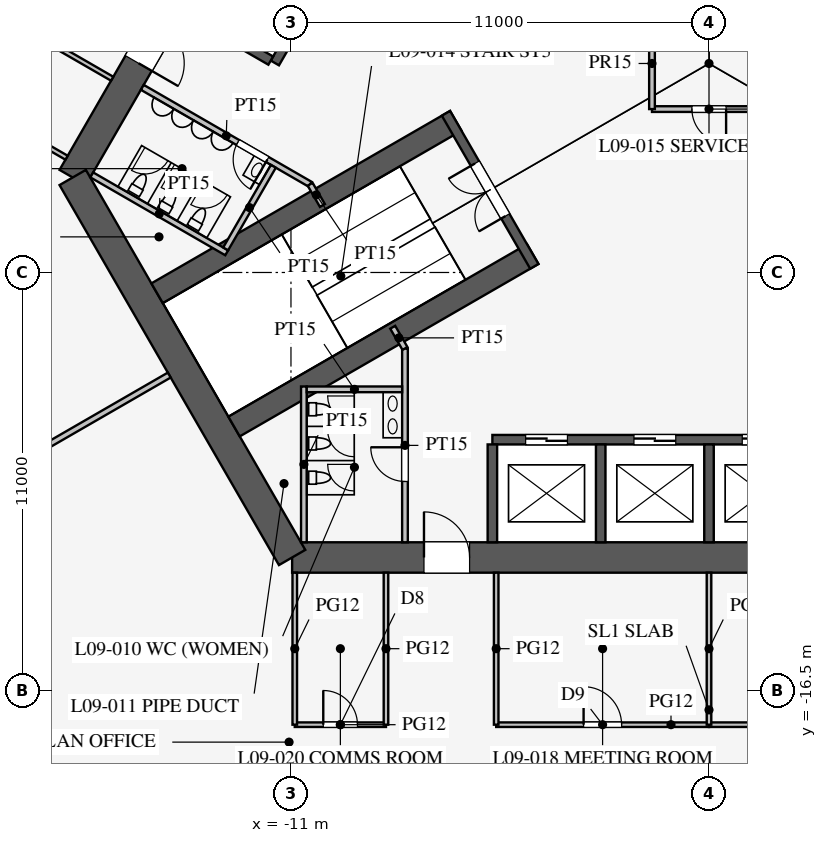
"""IFC4 building model, lengths in metres.
Left out: names, types, materials, properties, quantities, classifications, styles, units other than length and angle.
Written with IfcOpenShell. Run it as: python <this file> out.ifc"""

import sys

from ifc_helpers import new_model, si_unit, direction, frame, frame_2d, origin, place, context, subcontext, project, spatial, rectangle, extrude, element, fill, save


model = new_model("IFC4")
c1 = context("Model", 3, precision=1e-05, world=origin(), true_north=direction((0.0, 1.0)))
c2 = subcontext(c1, "Body", "Model", "MODEL_VIEW")
j1 = project(units=[si_unit("LENGTHUNIT", "METRE"), si_unit("PLANEANGLEUNIT", "RADIAN")], contexts=[c1])
p1 = place(None, origin())
s1 = spatial("IfcSite", under=j1, at=p1, CompositionType="ELEMENT")
p2 = place(p1, origin())
s2 = spatial("IfcBuilding", under=s1, at=p2, CompositionType="ELEMENT")
p3 = place(p2, frame((0.0, 0.0, 41.7)))
s3 = spatial("IfcBuildingStorey", under=s2, at=p3, CompositionType="ELEMENT", Elevation=41.7)
p4 = place(p3, frame((-10.97, -13.0, 0.0), z_axis=(0.0, 0.0, 1.0), x_axis=(1.0, 0.0, 0.0)))
e1 = element("IfcWall", 1, at=p4, inside=s3, PredefinedType="SHEAR", context=c2, shape_type="SweptSolid", body=[
    extrude(rectangle(XDim=21.939, YDim=0.8, at=frame_2d((10.97, 0.0))), origin(), (0.0, 0.0, 1.0), 4.2),
])
p5 = place(p4, frame((17.27, 0.0, 0.0)))
e2 = element("IfcOpeningElement", 2, at=p5, cuts=e1, PredefinedType="OPENING", context=c2, shape_type="SweptSolid", body=[
    extrude(rectangle(XDim=1.2, YDim=2.1, at=frame_2d((0.6, 1.05))), frame((0.0, 0.41, 0.0), z_axis=(0.0, -1.0, 0.0), x_axis=(1.0, 0.0, 0.0)), (0.0, 0.0, 1.0), 0.82),
])
p6 = place(p4, frame((3.47, 0.0, 0.0)))
e3 = element("IfcOpeningElement", 3, at=p6, cuts=e1, PredefinedType="OPENING", context=c2, shape_type="SweptSolid", body=[
    extrude(rectangle(XDim=1.2, YDim=2.1, at=frame_2d((0.6, 1.05))), frame((0.0, 0.41, 0.0), z_axis=(0.0, -1.0, 0.0), x_axis=(1.0, 0.0, 0.0)), (0.0, 0.0, 1.0), 0.82),
])
p7 = place(p3, frame((-5.773, 16.0, 0.0), z_axis=(0.0, 0.0, 1.0), x_axis=(-0.500002442456, -0.866023993627, 0.0)))
e4 = element("IfcWall", 4, at=p7, inside=s3, PredefinedType="SHEAR", context=c2, shape_type="SweptSolid", body=[
    extrude(rectangle(XDim=21.939, YDim=0.8, at=frame_2d((10.97, 0.0))), origin(), (0.0, 0.0, 1.0), 4.2),
])
p8 = place(p7, frame((17.27, 0.0, 0.0)))
e5 = element("IfcOpeningElement", 5, at=p8, cuts=e4, PredefinedType="OPENING", context=c2, shape_type="SweptSolid", body=[
    extrude(rectangle(XDim=1.2, YDim=2.1, at=frame_2d((0.6, 1.05))), frame((0.0, 0.41, 0.0), z_axis=(0.0, -1.0, 0.0), x_axis=(1.0, 0.0, 0.0)), (0.0, 0.0, 1.0), 0.82),
])
p9 = place(p7, frame((3.47, 0.0, 0.0)))
e6 = element("IfcOpeningElement", 6, at=p9, cuts=e4, PredefinedType="OPENING", context=c2, shape_type="SweptSolid", body=[
    extrude(rectangle(XDim=1.2, YDim=2.1, at=frame_2d((0.6, 1.05))), frame((0.0, 0.41, 0.0), z_axis=(0.0, -1.0, 0.0), x_axis=(1.0, 0.0, 0.0)), (0.0, 0.0, 1.0), 0.82),
])
p10 = place(p3, frame((-16.743, -3.0, 0.0), z_axis=(0.0, 0.0, 1.0), x_axis=(0.499995765644, -0.866027848477, 0.0)))
e7 = element("IfcWall", 7, at=p10, inside=s3, PredefinedType="SHEAR", context=c2, shape_type="SweptSolid", body=[
    extrude(rectangle(XDim=11.547, YDim=0.8, at=frame_2d((5.773, 0.0))), origin(), (0.0, 0.0, 1.0), 4.2),
])
p11 = place(p3, frame((-5.7, -9.9, 0.0), z_axis=(0.0, 0.0, 1.0), x_axis=(1.0, 0.0, 0.0)))
e8 = element("IfcWall", 8, at=p11, inside=s3, PredefinedType="SHEAR", context=c2, shape_type="SweptSolid", body=[
    extrude(rectangle(XDim=11.4, YDim=0.25, at=frame_2d((5.7, 0.0))), origin(), (0.0, 0.0, 1.0), 4.2),
])
p12 = place(p11, frame((0.875, 0.0, 0.0)))
e9 = element("IfcOpeningElement", 9, at=p12, cuts=e8, PredefinedType="OPENING", context=c2, shape_type="SweptSolid", body=[
    extrude(rectangle(XDim=1.1, YDim=2.2, at=frame_2d((0.55, 1.1))), frame((0.0, 0.135, 0.0), z_axis=(0.0, -1.0, 0.0), x_axis=(1.0, 0.0, 0.0)), (0.0, 0.0, 1.0), 0.27),
])
p13 = place(p11, frame((3.725, 0.0, 0.0)))
e10 = element("IfcOpeningElement", 10, at=p13, cuts=e8, PredefinedType="OPENING", context=c2, shape_type="SweptSolid", body=[
    extrude(rectangle(XDim=1.1, YDim=2.2, at=frame_2d((0.55, 1.1))), frame((0.0, 0.135, 0.0), z_axis=(0.0, -1.0, 0.0), x_axis=(1.0, 0.0, 0.0)), (0.0, 0.0, 1.0), 0.27),
])
p14 = place(p11, frame((6.575, 0.0, 0.0)))
e11 = element("IfcOpeningElement", 11, at=p14, cuts=e8, PredefinedType="OPENING", context=c2, shape_type="SweptSolid", body=[
    extrude(rectangle(XDim=1.1, YDim=2.2, at=frame_2d((0.55, 1.1))), frame((0.0, 0.135, 0.0), z_axis=(0.0, -1.0, 0.0), x_axis=(1.0, 0.0, 0.0)), (0.0, 0.0, 1.0), 0.27),
])
p15 = place(p11, frame((9.425, 0.0, 0.0)))
e12 = element("IfcOpeningElement", 12, at=p15, cuts=e8, PredefinedType="OPENING", context=c2, shape_type="SweptSolid", body=[
    extrude(rectangle(XDim=1.1, YDim=2.2, at=frame_2d((0.55, 1.1))), frame((0.0, 0.135, 0.0), z_axis=(0.0, -1.0, 0.0), x_axis=(1.0, 0.0, 0.0)), (0.0, 0.0, 1.0), 0.27),
])
for number, where, z_axis, x_axis in (
    (13, (-5.7, -10.025, 0.0), (0.0, 0.0, 1.0), (0.0, -1.0, 0.0)),
    (14, (-2.85, -10.025, 0.0), (0.0, 0.0, 1.0), (0.0, -1.0, 0.0)),
    (15, (0.0, -10.025, 0.0), (0.0, 0.0, 1.0), (0.0, -1.0, 0.0)),
):
    element("IfcWall", number, at=place(p3, frame(where, z_axis=z_axis, x_axis=x_axis)), inside=s3, PredefinedType="SHEAR", context=c2, shape_type="SweptSolid", body=[
        extrude(rectangle(XDim=2.575, YDim=0.25, at=frame_2d((1.288, 0.0))), origin(), (0.0, 0.0, 1.0), 4.2),
    ])
p16 = place(p3, frame((-5.724, 9.886, 0.0), z_axis=(0.0, 0.0, 1.0), x_axis=(-0.500001763848, -0.866024385424, 0.0)))
e16 = element("IfcWall", 16, at=p16, inside=s3, PredefinedType="SHEAR", context=c2, shape_type="SweptSolid", body=[
    extrude(rectangle(XDim=11.4, YDim=0.25, at=frame_2d((5.7, 0.0))), origin(), (0.0, 0.0, 1.0), 4.2),
])
p17 = place(p16, frame((6.525, 0.0, 0.0)))
e17 = element("IfcOpeningElement", 17, at=p17, cuts=e16, PredefinedType="OPENING", context=c2, shape_type="SweptSolid", body=[
    extrude(rectangle(XDim=1.2, YDim=2.2, at=frame_2d((0.6, 1.1))), frame((0.0, 0.135, 0.0), z_axis=(0.0, -1.0, 0.0), x_axis=(1.0, 0.0, 0.0)), (0.0, 0.0, 1.0), 0.27),
])
p18 = place(p16, frame((9.375, 0.0, 0.0)))
e18 = element("IfcOpeningElement", 18, at=p18, cuts=e16, PredefinedType="OPENING", context=c2, shape_type="SweptSolid", body=[
    extrude(rectangle(XDim=1.2, YDim=2.2, at=frame_2d((0.6, 1.1))), frame((0.0, 0.135, 0.0), z_axis=(0.0, -1.0, 0.0), x_axis=(1.0, 0.0, 0.0)), (0.0, 0.0, 1.0), 0.27),
])
p19 = place(p3, frame((-11.532, 0.076, 0.0), z_axis=(0.0, 0.0, 1.0), x_axis=(-0.866005588531, 0.500034319456, 0.0)))
e19 = element("IfcWall", 19, at=p19, inside=s3, PredefinedType="SHEAR", context=c2, shape_type="SweptSolid", body=[
    extrude(rectangle(XDim=2.575, YDim=0.25, at=frame_2d((1.288, 0.0))), origin(), (0.0, 0.0, 1.0), 4.2),
])
for number, where, z_axis, x_axis in (
    (20, (-6.663, -1.509, 0.0), (0.0, 0.0, 1.0), (-0.866, -0.5, 0.0)),
    (21, (-4.638, -5.016, 0.0), (0.0, 0.0, 1.0), (-0.866, -0.5, 0.0)),
):
    element("IfcWall", number, at=place(p3, frame(where, z_axis=z_axis, x_axis=x_axis)), inside=s3, PredefinedType="SHEAR", context=c2, shape_type="SweptSolid", body=[
        extrude(rectangle(XDim=9.075, YDim=0.6, at=frame_2d((4.538, 0.0))), origin(), (0.0, 0.0, 1.0), 4.2),
    ])
p20 = place(p3, frame((-6.922, -1.312, 0.0), z_axis=(0.0, 0.0, 1.0), x_axis=(0.499984536904, -0.866034331223, 0.0)))
e22 = element("IfcWall", 22, at=p20, inside=s3, PredefinedType="SHEAR", context=c2, shape_type="SweptSolid", body=[
    extrude(rectangle(XDim=4.65, YDim=0.25, at=frame_2d((2.325, 0.0))), origin(), (0.0, 0.0, 1.0), 4.2),
])
p21 = place(p20, frame((1.525, 0.0, 0.0)))
e23 = element("IfcOpeningElement", 23, at=p21, cuts=e22, PredefinedType="OPENING", context=c2, shape_type="SweptSolid", body=[
    extrude(rectangle(XDim=1.6, YDim=2.1, at=frame_2d((0.8, 1.05))), frame((0.0, 0.135, 0.0), z_axis=(0.0, -1.0, 0.0), x_axis=(1.0, 0.0, 0.0)), (0.0, 0.0, 1.0), 0.27),
])
p22 = place(p3, frame((-8.0, -7.5, 0.0), z_axis=(0.0, 0.0, 1.0), x_axis=(0.0, -1.0, 0.0)))
e24 = element("IfcWall", 24, at=p22, inside=s3, PredefinedType="PARTITIONING", context=c2, shape_type="SweptSolid", body=[
    extrude(rectangle(XDim=5.1, YDim=0.15, at=frame_2d((2.55, 0.0))), origin(), (0.0, 0.0, 1.0), 4.0),
])
p23 = place(p22, frame((2.6, 0.0, 0.0)))
e25 = element("IfcOpeningElement", 25, at=p23, cuts=e24, PredefinedType="OPENING", context=c2, shape_type="SweptSolid", body=[
    extrude(rectangle(XDim=0.9, YDim=2.1, at=frame_2d((0.45, 1.05))), frame((0.0, 0.085, 0.0), z_axis=(0.0, -1.0, 0.0), x_axis=(1.0, 0.0, 0.0)), (0.0, 0.0, 1.0), 0.17),
])
p24 = place(p3, frame((-10.495, -3.178, 0.0), z_axis=(0.0, 0.0, 1.0), x_axis=(-0.86602216432, 0.500005610874, 0.0)))
e26 = element("IfcWall", 26, at=p24, inside=s3, PredefinedType="PARTITIONING", context=c2, shape_type="SweptSolid", body=[
    extrude(rectangle(XDim=5.1, YDim=0.15, at=frame_2d((2.55, 0.0))), origin(), (0.0, 0.0, 1.0), 4.0),
])
p25 = place(p24, frame((1.3, 0.0, 0.0)))
e27 = element("IfcOpeningElement", 27, at=p25, cuts=e26, PredefinedType="OPENING", context=c2, shape_type="SweptSolid", body=[
    extrude(rectangle(XDim=0.9, YDim=2.1, at=frame_2d((0.45, 1.05))), frame((0.0, 0.085, 0.0), z_axis=(0.0, -1.0, 0.0), x_axis=(1.0, 0.0, 0.0)), (0.0, 0.0, 1.0), 0.17),
])
for number, where, z_axis, x_axis in (
    (28, (-10.495, -3.178, 0.0), (0.0, 0.0, 1.0), (0.5, -0.866, 0.0)),
    (29, (-8.0, -7.5, 0.0), (0.0, 0.0, 1.0), (-0.5, 0.866, 0.0)),
):
    element("IfcWall", number, at=place(p3, frame(where, z_axis=z_axis, x_axis=x_axis)), inside=s3, PredefinedType="PARTITIONING", context=c2, shape_type="SweptSolid", body=[
        extrude(rectangle(XDim=0.645, YDim=0.15, at=frame_2d((0.323, 0.0))), origin(), (0.0, 0.0, 1.0), 4.0),
    ])
p26 = place(p3, frame((-12.691, -4.982, 0.0), z_axis=(0.0, 0.0, 1.0), x_axis=(-0.8660249478, 0.500000789788, 0.0)))
e30 = element("IfcWall", 30, at=p26, inside=s3, PredefinedType="PARTITIONING", context=c2, shape_type="SweptSolid", body=[
    extrude(rectangle(XDim=4.1, YDim=0.15, at=frame_2d((2.05, 0.0))), origin(), (0.0, 0.0, 1.0), 4.0),
])
p27 = place(p3, frame((-11.464, -2.706, 0.0), z_axis=(0.0, 0.0, 1.0), x_axis=(-0.50001992892, -0.866013897511, 0.0)))
e31 = element("IfcWall", 31, at=p27, inside=s3, PredefinedType="PARTITIONING", context=c2, shape_type="SweptSolid", body=[
    extrude(rectangle(XDim=2.51, YDim=0.15, at=frame_2d((1.255, 0.0))), origin(), (0.0, 0.0, 1.0), 4.0),
])
p28 = place(p3, frame((-10.66, -8.5, 0.0), z_axis=(0.0, 0.0, 1.0), x_axis=(0.0, -1.0, 0.0)))
e32 = element("IfcWall", 32, at=p28, inside=s3, PredefinedType="PARTITIONING", context=c2, shape_type="SweptSolid", body=[
    extrude(rectangle(XDim=4.1, YDim=0.15, at=frame_2d((2.05, 0.0))), origin(), (0.0, 0.0, 1.0), 4.0),
])
p29 = place(p3, frame((-8.075, -8.575, 0.0), z_axis=(0.0, 0.0, 1.0), x_axis=(-1.0, 0.0, 0.0)))
e33 = element("IfcWall", 33, at=p29, inside=s3, PredefinedType="PARTITIONING", context=c2, shape_type="SweptSolid", body=[
    extrude(rectangle(XDim=2.51, YDim=0.15, at=frame_2d((1.255, 0.0))), origin(), (0.0, 0.0, 1.0), 4.0),
])
p30 = place(p3, frame((-1.5, -1.2, 0.0), z_axis=(0.0, 0.0, 1.0), x_axis=(1.0, 0.0, 0.0)))
e34 = element("IfcWall", 34, at=p30, inside=s3, PredefinedType="PARTITIONING", context=c2, shape_type="SweptSolid", body=[
    extrude(rectangle(XDim=3.0, YDim=0.15, at=frame_2d((1.5, 0.0))), origin(), (0.0, 0.0, 1.0), 4.0),
])
p31 = place(p30, frame((1.05, 0.0, 0.0)))
e35 = element("IfcOpeningElement", 35, at=p31, cuts=e34, PredefinedType="OPENING", context=c2, shape_type="SweptSolid", body=[
    extrude(rectangle(XDim=0.9, YDim=2.1, at=frame_2d((0.45, 1.05))), frame((0.0, 0.085, 0.0), z_axis=(0.0, -1.0, 0.0), x_axis=(1.0, 0.0, 0.0)), (0.0, 0.0, 1.0), 0.17),
])
p32 = place(p3, frame((-1.5, 1.2, 0.0), z_axis=(0.0, 0.0, 1.0), x_axis=(0.0, -1.0, 0.0)))
e36 = element("IfcWall", 36, at=p32, inside=s3, PredefinedType="PARTITIONING", context=c2, shape_type="SweptSolid", body=[
    extrude(rectangle(XDim=2.4, YDim=0.15, at=frame_2d((1.2, 0.0))), origin(), (0.0, 0.0, 1.0), 4.0),
])
p33 = place(p3, frame((-14.203, -8.2, 0.0), z_axis=(0.0, 0.0, 1.0), x_axis=(-0.866024965723, -0.500000758745, 0.0)))
e37 = element("IfcWall", 37, at=p33, inside=s3, PredefinedType="PARTITIONING", context=c2, shape_type="SweptSolid", body=[
    extrude(rectangle(XDim=18.25, YDim=0.15, at=frame_2d((9.125, 0.0))), origin(), (0.0, 0.0, 1.0), 2.3),
])
p34 = place(p3, frame((0.0, -17.4, 0.0), z_axis=(0.0, 0.0, 1.0), x_axis=(1.0, 0.0, 0.0)))
e38 = element("IfcWall", 38, at=p34, inside=s3, PredefinedType="PARTITIONING", context=c2, shape_type="SweptSolid", body=[
    extrude(rectangle(XDim=3.6, YDim=0.12, at=frame_2d((1.8, 0.0))), origin(), (0.0, 0.0, 1.0), 2.9),
])
p35 = place(p34, frame((1.3, 0.0, 0.15)))
e39 = element("IfcOpeningElement", 39, at=p35, cuts=e38, PredefinedType="OPENING", context=c2, shape_type="SweptSolid", body=[
    extrude(rectangle(XDim=1.0, YDim=2.1, at=frame_2d((0.5, 1.05))), frame((0.0, 0.07, 0.0), z_axis=(0.0, -1.0, 0.0), x_axis=(1.0, 0.0, 0.0)), (0.0, 0.0, 1.0), 0.14),
])
p36 = place(p3, frame((-10.9, -17.4, 0.0), z_axis=(0.0, 0.0, 1.0), x_axis=(1.0, 0.0, 0.0)))
e40 = element("IfcWall", 40, at=p36, inside=s3, PredefinedType="PARTITIONING", context=c2, shape_type="SweptSolid", body=[
    extrude(rectangle(XDim=2.4, YDim=0.12, at=frame_2d((1.2, 0.0))), origin(), (0.0, 0.0, 1.0), 2.9),
])
p37 = place(p36, frame((0.75, 0.0, 0.15)))
e41 = element("IfcOpeningElement", 41, at=p37, cuts=e40, PredefinedType="OPENING", context=c2, shape_type="SweptSolid", body=[
    extrude(rectangle(XDim=0.9, YDim=2.1, at=frame_2d((0.45, 1.05))), frame((0.0, 0.07, 0.0), z_axis=(0.0, -1.0, 0.0), x_axis=(1.0, 0.0, 0.0)), (0.0, 0.0, 1.0), 0.14),
])
p38 = place(p3, frame((-5.6, -17.4, 0.0), z_axis=(0.0, 0.0, 1.0), x_axis=(1.0, 0.0, 0.0)))
e42 = element("IfcWall", 42, at=p38, inside=s3, PredefinedType="PARTITIONING", context=c2, shape_type="SweptSolid", body=[
    extrude(rectangle(XDim=5.6, YDim=0.12, at=frame_2d((2.8, 0.0))), origin(), (0.0, 0.0, 1.0), 2.9),
])
p39 = place(p38, frame((2.3, 0.0, 0.15)))
e43 = element("IfcOpeningElement", 43, at=p39, cuts=e42, PredefinedType="OPENING", context=c2, shape_type="SweptSolid", body=[
    extrude(rectangle(XDim=1.0, YDim=2.1, at=frame_2d((0.5, 1.05))), frame((0.0, 0.07, 0.0), z_axis=(0.0, -1.0, 0.0), x_axis=(1.0, 0.0, 0.0)), (0.0, 0.0, 1.0), 0.14),
])
for number, where, z_axis, x_axis in (
    (44, (0.0, -13.4, 0.0), (0.0, 0.0, 1.0), (0.0, -1.0, 0.0)),
    (45, (-10.9, -13.4, 0.0), (0.0, 0.0, 1.0), (0.0, -1.0, 0.0)),
    (46, (-5.6, -13.4, 0.0), (0.0, 0.0, 1.0), (0.0, -1.0, 0.0)),
    (47, (-8.5, -13.4, 0.0), (0.0, 0.0, 1.0), (0.0, -1.0, 0.0)),
):
    element("IfcWall", number, at=place(p3, frame(where, z_axis=z_axis, x_axis=x_axis)), inside=s3, PredefinedType="PARTITIONING", context=c2, shape_type="SweptSolid", body=[
        extrude(rectangle(XDim=4.0, YDim=0.12, at=frame_2d((2.0, 0.0))), origin(), (0.0, 0.0, 1.0), 2.9),
    ])
p40 = place(p3, frame((26.415, -15.231, 0.0), z_axis=(0.0, 0.0, 1.0), x_axis=(-0.50000091641, 0.866024874695, 0.0)))
e48 = element("IfcWall", 48, at=p40, inside=s3, PredefinedType="PARTITIONING", context=c2, shape_type="SweptSolid", body=[
    extrude(rectangle(XDim=52.796, YDim=0.12, at=frame_2d((26.398, 0.0))), origin(), (0.0, 0.0, 1.0), 2.9),
])
p41 = place(p40, frame((10.2, 0.0, 0.15)))
e49 = element("IfcOpeningElement", 49, at=p41, cuts=e48, PredefinedType="OPENING", context=c2, shape_type="SweptSolid", body=[
    extrude(rectangle(XDim=1.8, YDim=2.1, at=frame_2d((0.9, 1.05))), frame((0.0, 0.07, 0.0), z_axis=(0.0, -1.0, 0.0), x_axis=(1.0, 0.0, 0.0)), (0.0, 0.0, 1.0), 0.14),
])
p42 = place(p40, frame((40.8, 0.0, 0.15)))
e50 = element("IfcOpeningElement", 50, at=p42, cuts=e48, PredefinedType="OPENING", context=c2, shape_type="SweptSolid", body=[
    extrude(rectangle(XDim=1.8, YDim=2.1, at=frame_2d((0.9, 1.05))), frame((0.0, 0.07, 0.0), z_axis=(0.0, -1.0, 0.0), x_axis=(1.0, 0.0, 0.0)), (0.0, 0.0, 1.0), 0.14),
])
for number, where, z_axis, x_axis in (
    (51, (-16.905, -2.48, 0.0), (0.0, 0.0, 1.0), (-0.866, 0.5, 0.0)),
    (52, (-15.705, -0.401, 0.0), (0.0, 0.0, 1.0), (-0.866, 0.5, 0.0)),
):
    element("IfcWall", number, at=place(p3, frame(where, z_axis=z_axis, x_axis=x_axis)), inside=s3, PredefinedType="PARTITIONING", context=c2, shape_type="SweptSolid", body=[
        extrude(rectangle(XDim=4.0, YDim=0.12, at=frame_2d((2.0, 0.0))), origin(), (0.0, 0.0, 1.0), 2.9),
    ])
p43 = place(p23, frame((0.9, 0.0, 0.0), z_axis=(0.0, 0.0, 1.0), x_axis=(-1.0, 0.0, 0.0)))
e53 = element("IfcDoor", 53, at=p43, inside=s3, OperationType="SINGLE_SWING_RIGHT", PredefinedType="DOOR", context=c2, shape_type="SweptSolid", body=[
    extrude(rectangle(XDim=0.9, YDim=2.1, at=frame_2d((0.45, 1.05))), frame((0.0, 0.025, 0.0), z_axis=(0.0, -1.0, 0.0), x_axis=(1.0, 0.0, 0.0)), (0.0, 0.0, 1.0), 0.05),
])
fill(e25, e53)
p44 = place(p25, origin())
e54 = element("IfcDoor", 54, at=p44, inside=s3, OperationType="SINGLE_SWING_LEFT", PredefinedType="DOOR", context=c2, shape_type="SweptSolid", body=[
    extrude(rectangle(XDim=0.9, YDim=2.1, at=frame_2d((0.45, 1.05))), frame((0.0, 0.025, 0.0), z_axis=(0.0, -1.0, 0.0), x_axis=(1.0, 0.0, 0.0)), (0.0, 0.0, 1.0), 0.05),
])
fill(e27, e54)
p45 = place(p31, frame((0.9, 0.0, 0.0), z_axis=(0.0, 0.0, 1.0), x_axis=(-1.0, 0.0, 0.0)))
e55 = element("IfcDoor", 55, at=p45, inside=s3, OperationType="SINGLE_SWING_LEFT", PredefinedType="DOOR", context=c2, shape_type="SweptSolid", body=[
    extrude(rectangle(XDim=0.9, YDim=2.1, at=frame_2d((0.45, 1.05))), frame((0.0, 0.025, 0.0), z_axis=(0.0, -1.0, 0.0), x_axis=(1.0, 0.0, 0.0)), (0.0, 0.0, 1.0), 0.05),
])
fill(e35, e55)
p46 = place(p21, frame((1.6, 0.0, 0.0), z_axis=(0.0, 0.0, 1.0), x_axis=(-1.0, 0.0, 0.0)))
e56 = element("IfcDoor", 56, at=p46, inside=s3, OperationType="DOUBLE_DOOR_SINGLE_SWING", PredefinedType="DOOR", context=c2, shape_type="SweptSolid", body=[
    extrude(rectangle(XDim=1.6, YDim=2.1, at=frame_2d((0.8, 1.05))), frame((0.0, 0.025, 0.0), z_axis=(0.0, -1.0, 0.0), x_axis=(1.0, 0.0, 0.0)), (0.0, 0.0, 1.0), 0.05),
])
fill(e23, e56)
p47 = place(p6, origin())
e57 = element("IfcDoor", 57, at=p47, inside=s3, OperationType="SINGLE_SWING_LEFT", PredefinedType="DOOR", context=c2, shape_type="SweptSolid", body=[
    extrude(rectangle(XDim=1.2, YDim=2.1, at=frame_2d((0.6, 1.05))), frame((0.0, 0.025, 0.0), z_axis=(0.0, -1.0, 0.0), x_axis=(1.0, 0.0, 0.0)), (0.0, 0.0, 1.0), 0.05),
])
fill(e3, e57)
p48 = place(p8, origin())
e58 = element("IfcDoor", 58, at=p48, inside=s3, OperationType="SINGLE_SWING_RIGHT", PredefinedType="DOOR", context=c2, shape_type="SweptSolid", body=[
    extrude(rectangle(XDim=1.2, YDim=2.1, at=frame_2d((0.6, 1.05))), frame((0.0, 0.025, 0.0), z_axis=(0.0, -1.0, 0.0), x_axis=(1.0, 0.0, 0.0)), (0.0, 0.0, 1.0), 0.05),
])
fill(e5, e58)
p49 = place(p39, origin())
e59 = element("IfcDoor", 59, at=p49, inside=s3, OperationType="SINGLE_SWING_LEFT", PredefinedType="DOOR", context=c2, shape_type="SweptSolid", body=[
    extrude(rectangle(XDim=1.0, YDim=2.1, at=frame_2d((0.5, 1.05))), frame((0.0, 0.025, 0.0), z_axis=(0.0, -1.0, 0.0), x_axis=(1.0, 0.0, 0.0)), (0.0, 0.0, 1.0), 0.05),
])
fill(e43, e59)
p50 = place(p37, origin())
e60 = element("IfcDoor", 60, at=p50, inside=s3, OperationType="SINGLE_SWING_LEFT", PredefinedType="DOOR", context=c2, shape_type="SweptSolid", body=[
    extrude(rectangle(XDim=0.9, YDim=2.1, at=frame_2d((0.45, 1.05))), frame((0.0, 0.025, 0.0), z_axis=(0.0, -1.0, 0.0), x_axis=(1.0, 0.0, 0.0)), (0.0, 0.0, 1.0), 0.05),
])
fill(e41, e60)
p51 = place(p12, origin())
e61 = element("IfcDoor", 61, at=p51, inside=s3, OperationType="DOUBLE_DOOR_SLIDING", PredefinedType="DOOR", context=c2, shape_type="SweptSolid", body=[
    extrude(rectangle(XDim=1.1, YDim=2.2, at=frame_2d((0.55, 1.1))), frame((0.0, 0.025, 0.0), z_axis=(0.0, -1.0, 0.0), x_axis=(1.0, 0.0, 0.0)), (0.0, 0.0, 1.0), 0.05),
])
fill(e9, e61)
p52 = place(p13, origin())
e62 = element("IfcDoor", 62, at=p52, inside=s3, OperationType="DOUBLE_DOOR_SLIDING", PredefinedType="DOOR", context=c2, shape_type="SweptSolid", body=[
    extrude(rectangle(XDim=1.1, YDim=2.2, at=frame_2d((0.55, 1.1))), frame((0.0, 0.025, 0.0), z_axis=(0.0, -1.0, 0.0), x_axis=(1.0, 0.0, 0.0)), (0.0, 0.0, 1.0), 0.05),
])
fill(e10, e62)
p53 = place(p14, origin())
e63 = element("IfcDoor", 63, at=p53, inside=s3, OperationType="DOUBLE_DOOR_SLIDING", PredefinedType="DOOR", context=c2, shape_type="SweptSolid", body=[
    extrude(rectangle(XDim=1.1, YDim=2.2, at=frame_2d((0.55, 1.1))), frame((0.0, 0.025, 0.0), z_axis=(0.0, -1.0, 0.0), x_axis=(1.0, 0.0, 0.0)), (0.0, 0.0, 1.0), 0.05),
])
fill(e11, e63)
save(model, sys.argv[1])
